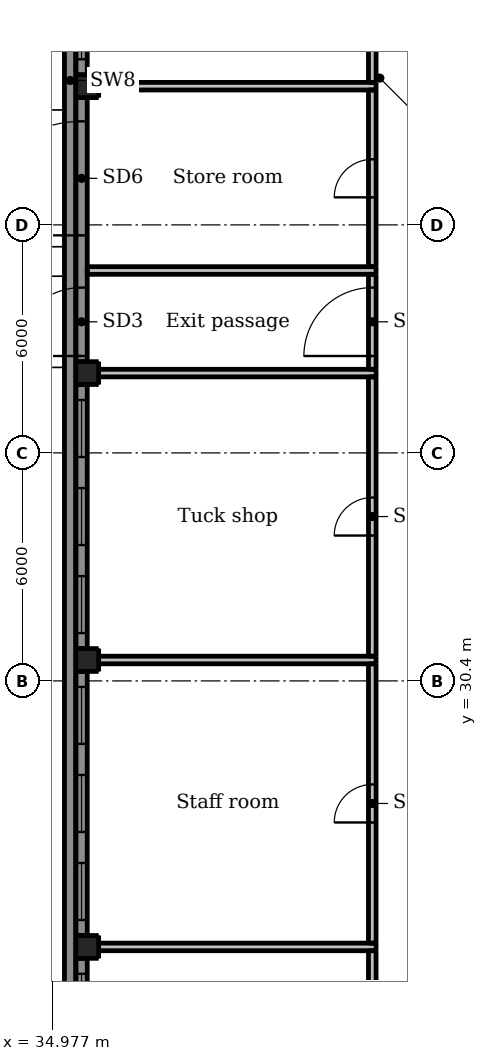
"""IFC4 building model, lengths in metres.
Left out: names, types, materials, properties, quantities, classifications, styles, units other than length and angle.
Written with IfcOpenShell. Run it as: python <this file> out.ifc"""

import sys

from ifc_helpers import new_model, si_unit, direction, frame, frame_2d, origin, origin_2d, place, context, subcontext, project, spatial, rectangle, extrude, element, fill, save


model = new_model("IFC4")
c1 = context("Model", 3, precision=1e-05, world=origin(), true_north=direction((0.0, 1.0)))
c2 = subcontext(c1, "Body", "Model", "MODEL_VIEW")
j1 = project(units=[si_unit("LENGTHUNIT", "METRE"), si_unit("PLANEANGLEUNIT", "RADIAN")], contexts=[c1])
p1 = place(None, origin())
s1 = spatial("IfcSite", under=j1, at=p1, CompositionType="ELEMENT")
p2 = place(p1, origin())
s2 = spatial("IfcBuilding", under=s1, at=p2, CompositionType="ELEMENT")
p3 = place(p2, origin())
s3 = spatial("IfcBuildingStorey", under=s2, at=p3, CompositionType="ELEMENT", Elevation=0.0)
for number, where, z_axis, x_axis in (
    (1, (35.9, 23.4, -0.3), (0.0, 0.0, 1.0), (1.0, 0.0, 0.0)),
    (2, (35.9, 30.95, -0.3), (0.0, 0.0, 1.0), (1.0, 0.0, 0.0)),
    (3, (35.9, 38.5, -0.3), (0.0, 0.0, 1.0), (1.0, 0.0, 0.0)),
    (4, (35.9, 46.05, -0.3), (0.0, 0.0, 1.0), (1.0, 0.0, 0.0)),
):
    element("IfcColumn", number, at=place(p3, frame(where, z_axis=z_axis, x_axis=x_axis)), inside=s3, PredefinedType="COLUMN", context=c2, shape_type="SweptSolid", body=[
        extrude(rectangle(XDim=0.6, YDim=0.6, at=origin_2d()), origin(), (0.0, 0.0, 1.0), 5.5),
    ])
p4 = place(p3, frame((35.75, 16.15, 0.0), z_axis=(0.0, 0.0, 1.0), x_axis=(0.0, 1.0, 0.0)))
e5 = element("IfcWall", 5, at=p4, inside=s3, PredefinedType="SOLIDWALL", context=c2, shape_type="SweptSolid", body=[
    extrude(rectangle(XDim=6.95, YDim=0.3, at=frame_2d((3.475, 0.0))), origin(), (0.0, 0.0, 1.0), 4.3),
])
p5 = place(p4, frame((0.408, 0.0, 0.9)))
e6 = element("IfcOpeningElement", 6, at=p5, cuts=e5, PredefinedType="OPENING", context=c2, shape_type="SweptSolid", body=[
    extrude(rectangle(XDim=1.5, YDim=1.5, at=frame_2d((0.75, 0.75))), frame((0.0, 0.16, 0.0), z_axis=(0.0, -1.0, 0.0), x_axis=(1.0, 0.0, 0.0)), (0.0, 0.0, 1.0), 0.32),
])
p6 = place(p4, frame((2.725, 0.0, 0.9)))
e7 = element("IfcOpeningElement", 7, at=p6, cuts=e5, PredefinedType="OPENING", context=c2, shape_type="SweptSolid", body=[
    extrude(rectangle(XDim=1.5, YDim=1.5, at=frame_2d((0.75, 0.75))), frame((0.0, 0.16, 0.0), z_axis=(0.0, -1.0, 0.0), x_axis=(1.0, 0.0, 0.0)), (0.0, 0.0, 1.0), 0.32),
])
p7 = place(p4, frame((5.042, 0.0, 0.9)))
e8 = element("IfcOpeningElement", 8, at=p7, cuts=e5, PredefinedType="OPENING", context=c2, shape_type="SweptSolid", body=[
    extrude(rectangle(XDim=1.5, YDim=1.5, at=frame_2d((0.75, 0.75))), frame((0.0, 0.16, 0.0), z_axis=(0.0, -1.0, 0.0), x_axis=(1.0, 0.0, 0.0)), (0.0, 0.0, 1.0), 0.32),
])
p8 = place(p3, frame((35.75, 23.7, 0.0), z_axis=(0.0, 0.0, 1.0), x_axis=(0.0, 1.0, 0.0)))
e9 = element("IfcWall", 9, at=p8, inside=s3, PredefinedType="SOLIDWALL", context=c2, shape_type="SweptSolid", body=[
    extrude(rectangle(XDim=6.95, YDim=0.3, at=frame_2d((3.475, 0.0))), origin(), (0.0, 0.0, 1.0), 4.3),
])
p9 = place(p8, frame((0.408, 0.0, 0.9)))
e10 = element("IfcOpeningElement", 10, at=p9, cuts=e9, PredefinedType="OPENING", context=c2, shape_type="SweptSolid", body=[
    extrude(rectangle(XDim=1.5, YDim=1.5, at=frame_2d((0.75, 0.75))), frame((0.0, 0.16, 0.0), z_axis=(0.0, -1.0, 0.0), x_axis=(1.0, 0.0, 0.0)), (0.0, 0.0, 1.0), 0.32),
])
p10 = place(p8, frame((2.725, 0.0, 0.9)))
e11 = element("IfcOpeningElement", 11, at=p10, cuts=e9, PredefinedType="OPENING", context=c2, shape_type="SweptSolid", body=[
    extrude(rectangle(XDim=1.5, YDim=1.5, at=frame_2d((0.75, 0.75))), frame((0.0, 0.16, 0.0), z_axis=(0.0, -1.0, 0.0), x_axis=(1.0, 0.0, 0.0)), (0.0, 0.0, 1.0), 0.32),
])
p11 = place(p8, frame((5.042, 0.0, 0.9)))
e12 = element("IfcOpeningElement", 12, at=p11, cuts=e9, PredefinedType="OPENING", context=c2, shape_type="SweptSolid", body=[
    extrude(rectangle(XDim=1.5, YDim=1.5, at=frame_2d((0.75, 0.75))), frame((0.0, 0.16, 0.0), z_axis=(0.0, -1.0, 0.0), x_axis=(1.0, 0.0, 0.0)), (0.0, 0.0, 1.0), 0.32),
])
p12 = place(p3, frame((35.75, 31.25, 0.0), z_axis=(0.0, 0.0, 1.0), x_axis=(0.0, 1.0, 0.0)))
e13 = element("IfcWall", 13, at=p12, inside=s3, PredefinedType="SOLIDWALL", context=c2, shape_type="SweptSolid", body=[
    extrude(rectangle(XDim=6.95, YDim=0.3, at=frame_2d((3.475, 0.0))), origin(), (0.0, 0.0, 1.0), 4.3),
])
p13 = place(p12, frame((0.408, 0.0, 0.9)))
e14 = element("IfcOpeningElement", 14, at=p13, cuts=e13, PredefinedType="OPENING", context=c2, shape_type="SweptSolid", body=[
    extrude(rectangle(XDim=1.5, YDim=1.5, at=frame_2d((0.75, 0.75))), frame((0.0, 0.16, 0.0), z_axis=(0.0, -1.0, 0.0), x_axis=(1.0, 0.0, 0.0)), (0.0, 0.0, 1.0), 0.32),
])
p14 = place(p12, frame((2.725, 0.0, 0.9)))
e15 = element("IfcOpeningElement", 15, at=p14, cuts=e13, PredefinedType="OPENING", context=c2, shape_type="SweptSolid", body=[
    extrude(rectangle(XDim=1.5, YDim=1.5, at=frame_2d((0.75, 0.75))), frame((0.0, 0.16, 0.0), z_axis=(0.0, -1.0, 0.0), x_axis=(1.0, 0.0, 0.0)), (0.0, 0.0, 1.0), 0.32),
])
p15 = place(p12, frame((5.042, 0.0, 0.9)))
e16 = element("IfcOpeningElement", 16, at=p15, cuts=e13, PredefinedType="OPENING", context=c2, shape_type="SweptSolid", body=[
    extrude(rectangle(XDim=1.5, YDim=1.5, at=frame_2d((0.75, 0.75))), frame((0.0, 0.16, 0.0), z_axis=(0.0, -1.0, 0.0), x_axis=(1.0, 0.0, 0.0)), (0.0, 0.0, 1.0), 0.32),
])
p16 = place(p3, frame((35.75, 38.8, 0.0), z_axis=(0.0, 0.0, 1.0), x_axis=(0.0, 1.0, 0.0)))
e17 = element("IfcWall", 17, at=p16, inside=s3, PredefinedType="SOLIDWALL", context=c2, shape_type="SweptSolid", body=[
    extrude(rectangle(XDim=6.95, YDim=0.3, at=frame_2d((3.475, 0.0))), origin(), (0.0, 0.0, 1.0), 4.3),
])
p17 = place(p16, frame((0.15, 0.0, 0.0)))
e18 = element("IfcOpeningElement", 18, at=p17, cuts=e17, PredefinedType="OPENING", context=c2, shape_type="SweptSolid", body=[
    extrude(rectangle(XDim=1.8, YDim=2.1, at=frame_2d((0.9, 1.05))), frame((0.0, 0.16, 0.0), z_axis=(0.0, -1.0, 0.0), x_axis=(1.0, 0.0, 0.0)), (0.0, 0.0, 1.0), 0.32),
])
p18 = place(p16, frame((3.325, 0.0, 0.0)))
e19 = element("IfcOpeningElement", 19, at=p18, cuts=e17, PredefinedType="OPENING", context=c2, shape_type="SweptSolid", body=[
    extrude(rectangle(XDim=3.0, YDim=2.0, at=frame_2d((1.5, 1.0))), frame((0.0, 0.16, 0.0), z_axis=(0.0, -1.0, 0.0), x_axis=(1.0, 0.0, 0.0)), (0.0, 0.0, 1.0), 0.32),
])
p19 = place(p3, frame((35.75, 46.35, 0.0), z_axis=(0.0, 0.0, 1.0), x_axis=(0.0, 1.0, 0.0)))
e20 = element("IfcWall", 20, at=p19, inside=s3, PredefinedType="SOLIDWALL", context=c2, shape_type="SweptSolid", body=[
    extrude(rectangle(XDim=6.95, YDim=0.3, at=frame_2d((3.475, 0.0))), origin(), (0.0, 0.0, 1.0), 4.3),
])
p20 = place(p19, frame((0.408, 0.0, 0.9)))
e21 = element("IfcOpeningElement", 21, at=p20, cuts=e20, PredefinedType="OPENING", context=c2, shape_type="SweptSolid", body=[
    extrude(rectangle(XDim=1.5, YDim=1.5, at=frame_2d((0.75, 0.75))), frame((0.0, 0.16, 0.0), z_axis=(0.0, -1.0, 0.0), x_axis=(1.0, 0.0, 0.0)), (0.0, 0.0, 1.0), 0.32),
])
p21 = place(p19, frame((2.725, 0.0, 0.9)))
e22 = element("IfcOpeningElement", 22, at=p21, cuts=e20, PredefinedType="OPENING", context=c2, shape_type="SweptSolid", body=[
    extrude(rectangle(XDim=1.5, YDim=1.5, at=frame_2d((0.75, 0.75))), frame((0.0, 0.16, 0.0), z_axis=(0.0, -1.0, 0.0), x_axis=(1.0, 0.0, 0.0)), (0.0, 0.0, 1.0), 0.32),
])
p22 = place(p19, frame((5.042, 0.0, 0.9)))
e23 = element("IfcOpeningElement", 23, at=p22, cuts=e20, PredefinedType="OPENING", context=c2, shape_type="SweptSolid", body=[
    extrude(rectangle(XDim=1.5, YDim=1.5, at=frame_2d((0.75, 0.75))), frame((0.0, 0.16, 0.0), z_axis=(0.0, -1.0, 0.0), x_axis=(1.0, 0.0, 0.0)), (0.0, 0.0, 1.0), 0.32),
])
p23 = place(p3, frame((35.45, 8.0, -0.3), z_axis=(0.0, 0.0, 1.0), x_axis=(0.0, 1.0, 0.0)))
e24 = element("IfcWall", 24, at=p23, inside=s3, PredefinedType="SOLIDWALL", context=c2, shape_type="SweptSolid", body=[
    extrude(rectangle(XDim=76.4, YDim=0.3, at=frame_2d((38.2, 0.0))), origin(), (0.0, 0.0, 1.0), 0.3),
])
p24 = place(p3, frame((43.4, 15.95, 0.0), z_axis=(0.0, 0.0, 1.0), x_axis=(0.0, 1.0, 0.0)))
e25 = element("IfcWall", 25, at=p24, inside=s3, PredefinedType="PARTITIONING", context=c2, shape_type="SweptSolid", body=[
    extrude(rectangle(XDim=7.35, YDim=0.2, at=frame_2d((3.675, 0.0))), origin(), (0.0, 0.0, 1.0), 4.1),
])
p25 = place(p24, frame((3.175, 0.0, 0.0)))
e26 = element("IfcOpeningElement", 26, at=p25, cuts=e25, PredefinedType="OPENING", context=c2, shape_type="SweptSolid", body=[
    extrude(rectangle(XDim=1.0, YDim=2.1, at=frame_2d((0.5, 1.05))), frame((0.0, 0.11, 0.0), z_axis=(0.0, -1.0, 0.0), x_axis=(1.0, 0.0, 0.0)), (0.0, 0.0, 1.0), 0.22),
])
p26 = place(p3, frame((43.4, 23.5, 0.0), z_axis=(0.0, 0.0, 1.0), x_axis=(0.0, 1.0, 0.0)))
e27 = element("IfcWall", 27, at=p26, inside=s3, PredefinedType="PARTITIONING", context=c2, shape_type="SweptSolid", body=[
    extrude(rectangle(XDim=7.35, YDim=0.2, at=frame_2d((3.675, 0.0))), origin(), (0.0, 0.0, 1.0), 4.1),
])
p27 = place(p26, frame((3.175, 0.0, 0.0)))
e28 = element("IfcOpeningElement", 28, at=p27, cuts=e27, PredefinedType="OPENING", context=c2, shape_type="SweptSolid", body=[
    extrude(rectangle(XDim=1.0, YDim=2.1, at=frame_2d((0.5, 1.05))), frame((0.0, 0.11, 0.0), z_axis=(0.0, -1.0, 0.0), x_axis=(1.0, 0.0, 0.0)), (0.0, 0.0, 1.0), 0.22),
])
p28 = place(p3, frame((43.4, 31.05, 0.0), z_axis=(0.0, 0.0, 1.0), x_axis=(0.0, 1.0, 0.0)))
e29 = element("IfcWall", 29, at=p28, inside=s3, PredefinedType="PARTITIONING", context=c2, shape_type="SweptSolid", body=[
    extrude(rectangle(XDim=7.35, YDim=0.2, at=frame_2d((3.675, 0.0))), origin(), (0.0, 0.0, 1.0), 4.1),
])
p29 = place(p28, frame((3.175, 0.0, 0.0)))
e30 = element("IfcOpeningElement", 30, at=p29, cuts=e29, PredefinedType="OPENING", context=c2, shape_type="SweptSolid", body=[
    extrude(rectangle(XDim=1.0, YDim=2.1, at=frame_2d((0.5, 1.05))), frame((0.0, 0.11, 0.0), z_axis=(0.0, -1.0, 0.0), x_axis=(1.0, 0.0, 0.0)), (0.0, 0.0, 1.0), 0.22),
])
p30 = place(p3, frame((43.4, 41.3, 0.0), z_axis=(0.0, 0.0, 1.0), x_axis=(0.0, 1.0, 0.0)))
e31 = element("IfcWall", 31, at=p30, inside=s3, PredefinedType="PARTITIONING", context=c2, shape_type="SweptSolid", body=[
    extrude(rectangle(XDim=4.65, YDim=0.2, at=frame_2d((2.325, 0.0))), origin(), (0.0, 0.0, 1.0), 4.1),
])
p31 = place(p30, frame((1.825, 0.0, 0.0)))
e32 = element("IfcOpeningElement", 32, at=p31, cuts=e31, PredefinedType="OPENING", context=c2, shape_type="SweptSolid", body=[
    extrude(rectangle(XDim=1.0, YDim=2.1, at=frame_2d((0.5, 1.05))), frame((0.0, 0.11, 0.0), z_axis=(0.0, -1.0, 0.0), x_axis=(1.0, 0.0, 0.0)), (0.0, 0.0, 1.0), 0.22),
])
p32 = place(p3, frame((43.4, 46.15, 0.0), z_axis=(0.0, 0.0, 1.0), x_axis=(0.0, 1.0, 0.0)))
e33 = element("IfcWall", 33, at=p32, inside=s3, PredefinedType="PARTITIONING", context=c2, shape_type="SweptSolid", body=[
    extrude(rectangle(XDim=14.9, YDim=0.2, at=frame_2d((7.45, 0.0))), origin(), (0.0, 0.0, 1.0), 4.1),
])
p33 = place(p32, frame((6.95, 0.0, 0.0)))
e34 = element("IfcOpeningElement", 34, at=p33, cuts=e33, PredefinedType="OPENING", context=c2, shape_type="SweptSolid", body=[
    extrude(rectangle(XDim=1.0, YDim=2.1, at=frame_2d((0.5, 1.05))), frame((0.0, 0.11, 0.0), z_axis=(0.0, -1.0, 0.0), x_axis=(1.0, 0.0, 0.0)), (0.0, 0.0, 1.0), 0.22),
])
for number, where, z_axis, x_axis in (
    (35, (36.2, 23.4, 0.0), (0.0, 0.0, 1.0), (1.0, 0.0, 0.0)),
    (36, (36.2, 30.95, 0.0), (0.0, 0.0, 1.0), (1.0, 0.0, 0.0)),
    (37, (36.2, 38.5, 0.0), (0.0, 0.0, 1.0), (1.0, 0.0, 0.0)),
):
    element("IfcWall", number, at=place(p3, frame(where, z_axis=z_axis, x_axis=x_axis)), inside=s3, PredefinedType="PARTITIONING", context=c2, shape_type="SweptSolid", body=[
        extrude(rectangle(XDim=7.3, YDim=0.2, at=frame_2d((3.65, 0.0))), origin(), (0.0, 0.0, 1.0), 4.1),
    ])
p34 = place(p3, frame((35.9, 41.2, 0.0), z_axis=(0.0, 0.0, 1.0), x_axis=(1.0, 0.0, 0.0)))
e38 = element("IfcWall", 38, at=p34, inside=s3, PredefinedType="PARTITIONING", context=c2, shape_type="SweptSolid", body=[
    extrude(rectangle(XDim=7.6, YDim=0.2, at=frame_2d((3.8, 0.0))), origin(), (0.0, 0.0, 1.0), 4.1),
])
p35 = place(p3, frame((36.2, 46.05, 0.0), z_axis=(0.0, 0.0, 1.0), x_axis=(1.0, 0.0, 0.0)))
e39 = element("IfcWall", 39, at=p35, inside=s3, PredefinedType="PARTITIONING", context=c2, shape_type="SweptSolid", body=[
    extrude(rectangle(XDim=7.3, YDim=0.2, at=frame_2d((3.65, 0.0))), origin(), (0.0, 0.0, 1.0), 4.1),
])
p36 = place(p3, frame((43.4, 38.6, 0.0), z_axis=(0.0, 0.0, 1.0), x_axis=(0.0, 1.0, 0.0)))
e40 = element("IfcWall", 40, at=p36, inside=s3, PredefinedType="PARTITIONING", context=c2, shape_type="SweptSolid", body=[
    extrude(rectangle(XDim=2.5, YDim=0.2, at=frame_2d((1.25, 0.0))), origin(), (0.0, 0.0, 1.0), 4.1),
])
p37 = place(p36, frame((0.35, 0.0, 0.0)))
e41 = element("IfcOpeningElement", 41, at=p37, cuts=e40, PredefinedType="OPENING", context=c2, shape_type="SweptSolid", body=[
    extrude(rectangle(XDim=1.8, YDim=2.1, at=frame_2d((0.9, 1.05))), frame((0.0, 0.11, 0.0), z_axis=(0.0, -1.0, 0.0), x_axis=(1.0, 0.0, 0.0)), (0.0, 0.0, 1.0), 0.22),
])
p38 = place(p7, origin())
e42 = element("IfcWindow", 42, at=p38, inside=s3, PartitioningType="DOUBLE_PANEL_HORIZONTAL", PredefinedType="WINDOW", context=c2, shape_type="SweptSolid", body=[
    extrude(rectangle(XDim=1.5, YDim=1.5, at=frame_2d((0.75, 0.75))), frame((0.0, 0.03, 0.0), z_axis=(0.0, -1.0, 0.0), x_axis=(1.0, 0.0, 0.0)), (0.0, 0.0, 1.0), 0.06),
])
fill(e8, e42)
p39 = place(p9, origin())
e43 = element("IfcWindow", 43, at=p39, inside=s3, PartitioningType="DOUBLE_PANEL_HORIZONTAL", PredefinedType="WINDOW", context=c2, shape_type="SweptSolid", body=[
    extrude(rectangle(XDim=1.5, YDim=1.5, at=frame_2d((0.75, 0.75))), frame((0.0, 0.03, 0.0), z_axis=(0.0, -1.0, 0.0), x_axis=(1.0, 0.0, 0.0)), (0.0, 0.0, 1.0), 0.06),
])
fill(e10, e43)
p40 = place(p10, origin())
e44 = element("IfcWindow", 44, at=p40, inside=s3, PartitioningType="DOUBLE_PANEL_HORIZONTAL", PredefinedType="WINDOW", context=c2, shape_type="SweptSolid", body=[
    extrude(rectangle(XDim=1.5, YDim=1.5, at=frame_2d((0.75, 0.75))), frame((0.0, 0.03, 0.0), z_axis=(0.0, -1.0, 0.0), x_axis=(1.0, 0.0, 0.0)), (0.0, 0.0, 1.0), 0.06),
])
fill(e11, e44)
p41 = place(p11, origin())
e45 = element("IfcWindow", 45, at=p41, inside=s3, PartitioningType="DOUBLE_PANEL_HORIZONTAL", PredefinedType="WINDOW", context=c2, shape_type="SweptSolid", body=[
    extrude(rectangle(XDim=1.5, YDim=1.5, at=frame_2d((0.75, 0.75))), frame((0.0, 0.03, 0.0), z_axis=(0.0, -1.0, 0.0), x_axis=(1.0, 0.0, 0.0)), (0.0, 0.0, 1.0), 0.06),
])
fill(e12, e45)
p42 = place(p13, origin())
e46 = element("IfcWindow", 46, at=p42, inside=s3, PartitioningType="DOUBLE_PANEL_HORIZONTAL", PredefinedType="WINDOW", context=c2, shape_type="SweptSolid", body=[
    extrude(rectangle(XDim=1.5, YDim=1.5, at=frame_2d((0.75, 0.75))), frame((0.0, 0.03, 0.0), z_axis=(0.0, -1.0, 0.0), x_axis=(1.0, 0.0, 0.0)), (0.0, 0.0, 1.0), 0.06),
])
fill(e14, e46)
p43 = place(p14, origin())
e47 = element("IfcWindow", 47, at=p43, inside=s3, PartitioningType="DOUBLE_PANEL_HORIZONTAL", PredefinedType="WINDOW", context=c2, shape_type="SweptSolid", body=[
    extrude(rectangle(XDim=1.5, YDim=1.5, at=frame_2d((0.75, 0.75))), frame((0.0, 0.03, 0.0), z_axis=(0.0, -1.0, 0.0), x_axis=(1.0, 0.0, 0.0)), (0.0, 0.0, 1.0), 0.06),
])
fill(e15, e47)
p44 = place(p15, origin())
e48 = element("IfcWindow", 48, at=p44, inside=s3, PartitioningType="DOUBLE_PANEL_HORIZONTAL", PredefinedType="WINDOW", context=c2, shape_type="SweptSolid", body=[
    extrude(rectangle(XDim=1.5, YDim=1.5, at=frame_2d((0.75, 0.75))), frame((0.0, 0.03, 0.0), z_axis=(0.0, -1.0, 0.0), x_axis=(1.0, 0.0, 0.0)), (0.0, 0.0, 1.0), 0.06),
])
fill(e16, e48)
p45 = place(p17, origin())
e49 = element("IfcDoor", 49, at=p45, inside=s3, OperationType="DOUBLE_DOOR_SINGLE_SWING", PredefinedType="DOOR", context=c2, shape_type="SweptSolid", body=[
    extrude(rectangle(XDim=1.8, YDim=2.1, at=frame_2d((0.9, 1.05))), frame((0.0, 0.025, 0.0), z_axis=(0.0, -1.0, 0.0), x_axis=(1.0, 0.0, 0.0)), (0.0, 0.0, 1.0), 0.05),
])
fill(e18, e49)
p46 = place(p18, origin())
e50 = element("IfcDoor", 50, at=p46, inside=s3, OperationType="DOUBLE_DOOR_SINGLE_SWING", PredefinedType="GATE", context=c2, shape_type="SweptSolid", body=[
    extrude(rectangle(XDim=3.0, YDim=2.0, at=frame_2d((1.5, 1.0))), frame((0.0, 0.025, 0.0), z_axis=(0.0, -1.0, 0.0), x_axis=(1.0, 0.0, 0.0)), (0.0, 0.0, 1.0), 0.05),
])
fill(e19, e50)
p47 = place(p20, origin())
e51 = element("IfcWindow", 51, at=p47, inside=s3, PartitioningType="DOUBLE_PANEL_HORIZONTAL", PredefinedType="WINDOW", context=c2, shape_type="SweptSolid", body=[
    extrude(rectangle(XDim=1.5, YDim=1.5, at=frame_2d((0.75, 0.75))), frame((0.0, 0.03, 0.0), z_axis=(0.0, -1.0, 0.0), x_axis=(1.0, 0.0, 0.0)), (0.0, 0.0, 1.0), 0.06),
])
fill(e21, e51)
p48 = place(p27, origin())
e52 = element("IfcDoor", 52, at=p48, inside=s3, OperationType="SINGLE_SWING_LEFT", PredefinedType="DOOR", context=c2, shape_type="SweptSolid", body=[
    extrude(rectangle(XDim=1.0, YDim=2.1, at=frame_2d((0.5, 1.05))), frame((0.0, 0.025, 0.0), z_axis=(0.0, -1.0, 0.0), x_axis=(1.0, 0.0, 0.0)), (0.0, 0.0, 1.0), 0.05),
])
fill(e28, e52)
p49 = place(p29, origin())
e53 = element("IfcDoor", 53, at=p49, inside=s3, OperationType="SINGLE_SWING_LEFT", PredefinedType="DOOR", context=c2, shape_type="SweptSolid", body=[
    extrude(rectangle(XDim=1.0, YDim=2.1, at=frame_2d((0.5, 1.05))), frame((0.0, 0.025, 0.0), z_axis=(0.0, -1.0, 0.0), x_axis=(1.0, 0.0, 0.0)), (0.0, 0.0, 1.0), 0.05),
])
fill(e30, e53)
p50 = place(p31, origin())
e54 = element("IfcDoor", 54, at=p50, inside=s3, OperationType="SINGLE_SWING_LEFT", PredefinedType="DOOR", context=c2, shape_type="SweptSolid", body=[
    extrude(rectangle(XDim=1.0, YDim=2.1, at=frame_2d((0.5, 1.05))), frame((0.0, 0.025, 0.0), z_axis=(0.0, -1.0, 0.0), x_axis=(1.0, 0.0, 0.0)), (0.0, 0.0, 1.0), 0.05),
])
fill(e32, e54)
p51 = place(p37, origin())
e55 = element("IfcDoor", 55, at=p51, inside=s3, OperationType="DOUBLE_DOOR_SINGLE_SWING", PredefinedType="DOOR", context=c2, shape_type="SweptSolid", body=[
    extrude(rectangle(XDim=1.8, YDim=2.1, at=frame_2d((0.9, 1.05))), frame((0.0, 0.025, 0.0), z_axis=(0.0, -1.0, 0.0), x_axis=(1.0, 0.0, 0.0)), (0.0, 0.0, 1.0), 0.05),
])
fill(e41, e55)
save(model, sys.argv[1])
